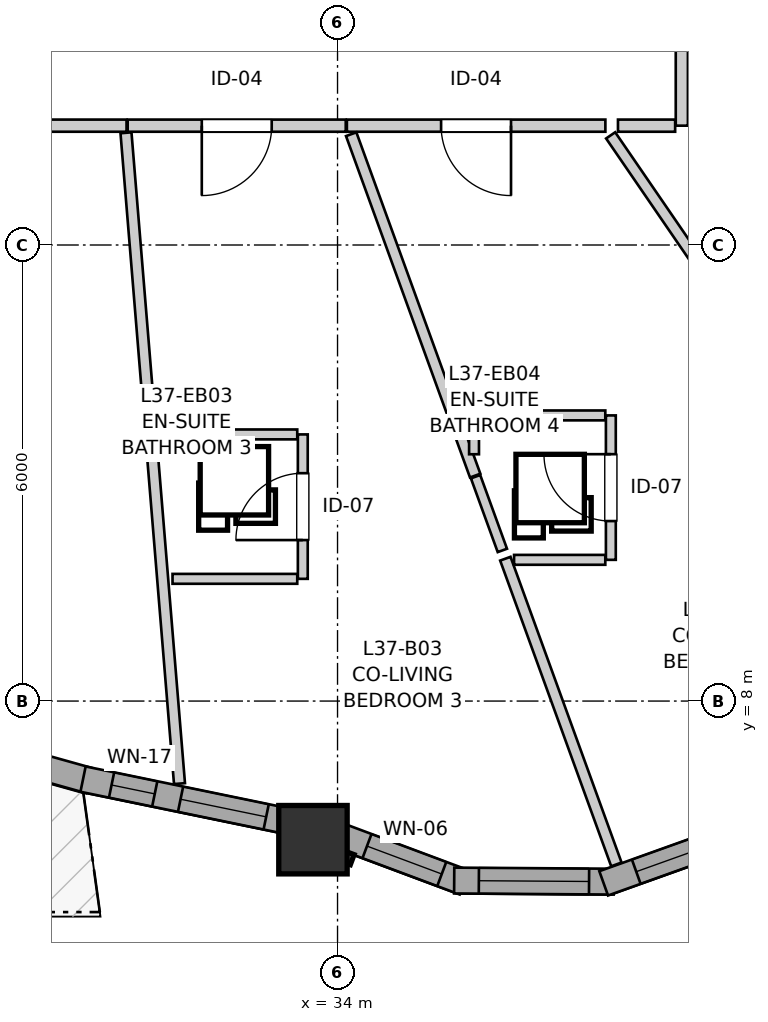
"""IFC4 building model, lengths in metres.
Left out: names, types, materials, properties, quantities, classifications, styles, units other than length and angle.
Written with IfcOpenShell. Run it as: python <this file> out.ifc"""

import sys

from ifc_helpers import new_model, si_unit, direction, frame, frame_2d, origin, origin_2d, place, context, subcontext, project, spatial, rectangle, extrude, source, transform, mapped, element, fill, save


model = new_model("IFC4")
c1 = context("Model", 3, precision=1e-05, world=origin(), true_north=direction((0.0, 1.0)))
c2 = subcontext(c1, "Body", "Model", "MODEL_VIEW")
j1 = project(units=[si_unit("LENGTHUNIT", "METRE"), si_unit("PLANEANGLEUNIT", "RADIAN")], contexts=[c1])
p1 = place(None, origin())
s1 = spatial("IfcSite", under=j1, at=p1, CompositionType="ELEMENT")
p2 = place(p1, origin())
s2 = spatial("IfcBuilding", under=s1, at=p2, CompositionType="ELEMENT")
p3 = place(p2, frame((0.0, 0.0, 124.8)))
s3 = spatial("IfcBuildingStorey", under=s2, at=p3, CompositionType="ELEMENT", Elevation=124.8)
m1 = source(origin(), c2, "Body", "SweptSolid", [
    extrude(rectangle(XDim=0.9, YDim=0.9, at=origin_2d()), origin(), (0.0, 0.0, 1.0), 2.9),
])
p4 = place(p3, frame((33.677, 6.176, 0.0), z_axis=(0.0, 0.0, 1.0), x_axis=(1.0, 0.0, 0.0)))
e1 = element("IfcColumn", 1, at=p4, inside=s3, PredefinedType="COLUMN", context=c2, shape_type="MappedRepresentation", body=[
    mapped(m1, transform((0.0, 0.0, 0.0), x_axis=(1.0, 0.0, 0.0), y_axis=(0.0, 1.0, 0.0), z_axis=(0.0, 0.0, 1.0), scale=1.0)),
])
p5 = place(p3, frame((27.811, 7.771, 0.0), z_axis=(0.0, 0.0, 1.0), x_axis=(0.963039905189, -0.269358758934, 0.0)))
e2 = element("IfcWall", 2, at=p5, inside=s3, PredefinedType="SOLIDWALL", context=c2, shape_type="SweptSolid", body=[
    extrude(rectangle(XDim=3.039, YDim=0.34, at=frame_2d((1.52, 0.0))), origin(), (0.0, 0.0, 1.0), 2.43),
])
p6 = place(p5, frame((0.935, 0.0, 0.82)))
e3 = element("IfcOpeningElement", 3, at=p6, cuts=e2, PredefinedType="OPENING", context=c2, shape_type="SweptSolid", body=[
    extrude(rectangle(XDim=1.15, YDim=1.2, at=frame_2d((0.575, 0.6))), frame((0.0, 0.18, 0.0), z_axis=(0.0, -1.0, 0.0), x_axis=(1.0, 0.0, 0.0)), (0.0, 0.0, 1.0), 0.36),
])
p7 = place(p3, frame((30.652, 6.973, 0.0), z_axis=(0.0, 0.0, 1.0), x_axis=(0.979418300652, -0.201841007595, 0.0)))
e4 = element("IfcWall", 4, at=p7, inside=s3, PredefinedType="SOLIDWALL", context=c2, shape_type="SweptSolid", body=[
    extrude(rectangle(XDim=2.893, YDim=0.34, at=frame_2d((1.447, 0.0))), origin(), (0.0, 0.0, 1.0), 2.43),
])
p8 = place(p7, frame((0.383, 0.0, 0.82)))
e5 = element("IfcOpeningElement", 5, at=p8, cuts=e4, PredefinedType="OPENING", context=c2, shape_type="SweptSolid", body=[
    extrude(rectangle(XDim=0.58, YDim=1.35, at=frame_2d((0.29, 0.675))), frame((0.0, 0.18, 0.0), z_axis=(0.0, -1.0, 0.0), x_axis=(1.0, 0.0, 0.0)), (0.0, 0.0, 1.0), 0.36),
])
p9 = place(p7, frame((1.31, 0.0, 0.82)))
e6 = element("IfcOpeningElement", 6, at=p9, cuts=e4, PredefinedType="OPENING", context=c2, shape_type="SweptSolid", body=[
    extrude(rectangle(XDim=1.15, YDim=1.2, at=frame_2d((0.575, 0.6))), frame((0.0, 0.18, 0.0), z_axis=(0.0, -1.0, 0.0), x_axis=(1.0, 0.0, 0.0)), (0.0, 0.0, 1.0), 0.36),
])
p10 = place(p3, frame((33.952, 6.255, 0.0), z_axis=(0.0, 0.0, 1.0), x_axis=(0.936799566991, -0.349866504951, 0.0)))
e7 = element("IfcWall", 7, at=p10, inside=s3, PredefinedType="SOLIDWALL", context=c2, shape_type="SweptSolid", body=[
    extrude(rectangle(XDim=1.831, YDim=0.34, at=frame_2d((0.916, 0.0))), origin(), (0.0, 0.0, 1.0), 2.43),
])
p11 = place(p10, frame((0.466, 0.0, 0.82)))
e8 = element("IfcOpeningElement", 8, at=p11, cuts=e7, PredefinedType="OPENING", context=c2, shape_type="SweptSolid", body=[
    extrude(rectangle(XDim=1.05, YDim=1.45, at=frame_2d((0.525, 0.725))), frame((0.0, 0.18, 0.0), z_axis=(0.0, -1.0, 0.0), x_axis=(1.0, 0.0, 0.0)), (0.0, 0.0, 1.0), 0.36),
])
p12 = place(p3, frame((35.535, 5.639, 0.0), z_axis=(0.0, 0.0, 1.0), x_axis=(0.999976456891, -0.00686189939, 0.0)))
e9 = element("IfcWall", 9, at=p12, inside=s3, PredefinedType="SOLIDWALL", context=c2, shape_type="SweptSolid", body=[
    extrude(rectangle(XDim=2.099, YDim=0.34, at=frame_2d((1.05, 0.0))), origin(), (0.0, 0.0, 1.0), 2.43),
])
p13 = place(p12, frame((0.324, 0.0, 0.82)))
e10 = element("IfcOpeningElement", 10, at=p13, cuts=e9, PredefinedType="OPENING", context=c2, shape_type="SweptSolid", body=[
    extrude(rectangle(XDim=1.45, YDim=1.25, at=frame_2d((0.725, 0.625))), frame((0.0, 0.18, 0.0), z_axis=(0.0, -1.0, 0.0), x_axis=(1.0, 0.0, 0.0)), (0.0, 0.0, 1.0), 0.36),
])
p14 = place(p3, frame((37.502, 5.602, 0.0), z_axis=(0.0, 0.0, 1.0), x_axis=(0.941523304278, 0.336947870598, 0.0)))
e11 = element("IfcWall", 11, at=p14, inside=s3, PredefinedType="SOLIDWALL", context=c2, shape_type="SweptSolid", body=[
    extrude(rectangle(XDim=2.099, YDim=0.34, at=frame_2d((1.05, 0.0))), origin(), (0.0, 0.0, 1.0), 2.43),
])
p15 = place(p14, frame((0.455, 0.0, 0.82)))
e12 = element("IfcOpeningElement", 12, at=p15, cuts=e11, PredefinedType="OPENING", context=c2, shape_type="SweptSolid", body=[
    extrude(rectangle(XDim=1.35, YDim=1.45, at=frame_2d((0.675, 0.725))), frame((0.0, 0.18, 0.0), z_axis=(0.0, -1.0, 0.0), x_axis=(1.0, 0.0, 0.0)), (0.0, 0.0, 1.0), 0.36),
])
p16 = place(p3, frame((38.53, 21.321, 0.0), z_axis=(0.0, 0.0, 1.0), x_axis=(0.0, -1.0, 0.0)))
e13 = element("IfcWall", 13, at=p16, inside=s3, PredefinedType="PARTITIONING", context=c2, shape_type="SweptSolid", body=[
    extrude(rectangle(XDim=5.751, YDim=0.16, at=frame_2d((2.875, 0.0))), origin(), (0.0, 0.0, 1.0), 2.9),
])
p17 = place(p16, frame((2.404, 0.0, 0.0)))
e14 = element("IfcOpeningElement", 14, at=p17, cuts=e13, PredefinedType="OPENING", context=c2, shape_type="SweptSolid", body=[
    extrude(rectangle(XDim=0.96, YDim=2.1, at=frame_2d((0.48, 1.05))), frame((0.0, 0.09, 0.0), z_axis=(0.0, -1.0, 0.0), x_axis=(1.0, 0.0, 0.0)), (0.0, 0.0, 1.0), 0.18),
])
p18 = place(p3, frame((31.224, 15.57, 0.0), z_axis=(0.0, 0.0, 1.0), x_axis=(-1.0, 0.0, 0.0)))
e15 = element("IfcWall", 15, at=p18, inside=s3, PredefinedType="PARTITIONING", context=c2, shape_type="SweptSolid", body=[
    extrude(rectangle(XDim=3.679, YDim=0.16, at=frame_2d((1.84, 0.0))), origin(), (0.0, 0.0, 1.0), 2.9),
])
p19 = place(p18, frame((1.212, 0.0, 0.0)))
e16 = element("IfcOpeningElement", 16, at=p19, cuts=e15, PredefinedType="OPENING", context=c2, shape_type="SweptSolid", body=[
    extrude(rectangle(XDim=1.3, YDim=2.1, at=frame_2d((0.65, 1.05))), frame((0.0, 0.09, 0.0), z_axis=(0.0, -1.0, 0.0), x_axis=(1.0, 0.0, 0.0)), (0.0, 0.0, 1.0), 0.18),
])
p20 = place(p3, frame((37.524, 15.57, 0.0), z_axis=(0.0, 0.0, 1.0), x_axis=(-1.0, 0.0, 0.0)))
e17 = element("IfcWall", 17, at=p20, inside=s3, PredefinedType="PARTITIONING", context=c2, shape_type="SweptSolid", body=[
    extrude(rectangle(XDim=3.401, YDim=0.16, at=frame_2d((1.7, 0.0))), origin(), (0.0, 0.0, 1.0), 2.9),
])
p21 = place(p20, frame((1.241, 0.0, 0.0)))
e18 = element("IfcOpeningElement", 18, at=p21, cuts=e17, PredefinedType="OPENING", context=c2, shape_type="SweptSolid", body=[
    extrude(rectangle(XDim=0.92, YDim=2.1, at=frame_2d((0.46, 1.05))), frame((0.0, 0.09, 0.0), z_axis=(0.0, -1.0, 0.0), x_axis=(1.0, 0.0, 0.0)), (0.0, 0.0, 1.0), 0.18),
])
p22 = place(p3, frame((34.108, 15.57, 0.0), z_axis=(0.0, 0.0, 1.0), x_axis=(-1.0, 0.0, 0.0)))
e19 = element("IfcWall", 19, at=p22, inside=s3, PredefinedType="PARTITIONING", context=c2, shape_type="SweptSolid", body=[
    extrude(rectangle(XDim=2.869, YDim=0.16, at=frame_2d((1.435, 0.0))), origin(), (0.0, 0.0, 1.0), 2.9),
])
p23 = place(p22, frame((0.974, 0.0, 0.0)))
e20 = element("IfcOpeningElement", 20, at=p23, cuts=e19, PredefinedType="OPENING", context=c2, shape_type="SweptSolid", body=[
    extrude(rectangle(XDim=0.92, YDim=2.1, at=frame_2d((0.46, 1.05))), frame((0.0, 0.09, 0.0), z_axis=(0.0, -1.0, 0.0), x_axis=(1.0, 0.0, 0.0)), (0.0, 0.0, 1.0), 0.18),
])
p24 = place(p3, frame((33.543, 9.608, 0.0), z_axis=(0.0, 0.0, 1.0), x_axis=(0.0, 1.0, 0.0)))
e21 = element("IfcWall", 21, at=p24, inside=s3, PredefinedType="PARTITIONING", context=c2, shape_type="SweptSolid", body=[
    extrude(rectangle(XDim=1.9, YDim=0.13, at=frame_2d((0.95, 0.0))), origin(), (0.0, 0.0, 1.0), 2.9),
])
p25 = place(p24, frame((0.51, 0.0, 0.0)))
e22 = element("IfcOpeningElement", 22, at=p25, cuts=e21, PredefinedType="OPENING", context=c2, shape_type="SweptSolid", body=[
    extrude(rectangle(XDim=0.88, YDim=2.05, at=frame_2d((0.44, 1.025))), frame((0.0, 0.075, 0.0), z_axis=(0.0, -1.0, 0.0), x_axis=(1.0, 0.0, 0.0)), (0.0, 0.0, 1.0), 0.15),
])
p26 = place(p3, frame((37.596, 9.858, 0.0), z_axis=(0.0, 0.0, 1.0), x_axis=(0.0, 1.0, 0.0)))
e23 = element("IfcWall", 23, at=p26, inside=s3, PredefinedType="PARTITIONING", context=c2, shape_type="SweptSolid", body=[
    extrude(rectangle(XDim=1.9, YDim=0.13, at=frame_2d((0.95, 0.0))), origin(), (0.0, 0.0, 1.0), 2.9),
])
p27 = place(p26, frame((0.51, 0.0, 0.0)))
e24 = element("IfcOpeningElement", 24, at=p27, cuts=e23, PredefinedType="OPENING", context=c2, shape_type="SweptSolid", body=[
    extrude(rectangle(XDim=0.88, YDim=2.05, at=frame_2d((0.44, 1.025))), frame((0.0, 0.075, 0.0), z_axis=(0.0, -1.0, 0.0), x_axis=(1.0, 0.0, 0.0)), (0.0, 0.0, 1.0), 0.15),
])
p28 = place(p3, frame((31.217, 15.476, 0.0), z_axis=(0.0, 0.0, 1.0), x_axis=(0.081928316893, -0.996638224679, 0.0)))
e25 = element("IfcWall", 25, at=p28, inside=s3, PredefinedType="PARTITIONING", context=c2, shape_type="SweptSolid", body=[
    extrude(rectangle(XDim=8.591, YDim=0.145, at=frame_2d((4.295, 0.0))), origin(), (0.0, 0.0, 1.0), 2.9),
])
p29 = place(p3, frame((37.594, 15.442, 0.0), z_axis=(0.0, 0.0, 1.0), x_axis=(0.565681325722, -0.824623937155, 0.0)))
e26 = element("IfcWall", 26, at=p29, inside=s3, PredefinedType="PARTITIONING", context=c2, shape_type="SweptSolid", body=[
    extrude(rectangle(XDim=7.35, YDim=0.145, at=frame_2d((3.675, 0.0))), origin(), (0.0, 0.0, 1.0), 2.9),
])
p30 = place(p3, frame((34.18, 15.458, 0.0), z_axis=(0.0, 0.0, 1.0), x_axis=(0.341373856507, -0.939927598325, 0.0)))
e27 = element("IfcWall", 27, at=p30, inside=s3, PredefinedType="PARTITIONING", context=c2, shape_type="SweptSolid", body=[
    extrude(rectangle(XDim=4.779, YDim=0.145, at=frame_2d((2.389, 0.0))), origin(), (0.0, 0.0, 1.0), 2.9),
])
p31 = place(p3, frame((36.208, 9.873, 0.0), z_axis=(0.0, 0.0, 1.0), x_axis=(0.341362804218, -0.939931612351, 0.0)))
e28 = element("IfcWall", 28, at=p31, inside=s3, PredefinedType="PARTITIONING", context=c2, shape_type="SweptSolid", body=[
    extrude(rectangle(XDim=4.279, YDim=0.145, at=frame_2d((2.14, 0.0))), origin(), (0.0, 0.0, 1.0), 2.9),
])
p32 = place(p3, frame((31.743, 11.508, 0.0), z_axis=(0.0, 0.0, 1.0), x_axis=(1.0, 0.0, 0.0)))
e29 = element("IfcWall", 29, at=p32, inside=s3, PredefinedType="PARTITIONING", context=c2, shape_type="SweptSolid", body=[
    extrude(rectangle(XDim=1.727, YDim=0.13, at=frame_2d((0.864, 0.0))), origin(), (0.0, 0.0, 1.0), 2.9),
])
p33 = place(p3, frame((31.829, 9.608, 0.0), z_axis=(0.0, 0.0, 1.0), x_axis=(1.0, 0.0, 0.0)))
e30 = element("IfcWall", 30, at=p33, inside=s3, PredefinedType="PARTITIONING", context=c2, shape_type="SweptSolid", body=[
    extrude(rectangle(XDim=1.641, YDim=0.13, at=frame_2d((0.82, 0.0))), origin(), (0.0, 0.0, 1.0), 2.508),
])
p34 = place(p3, frame((35.796, 11.758, 0.0), z_axis=(0.0, 0.0, 1.0), x_axis=(1.0, 0.0, 0.0)))
e31 = element("IfcWall", 31, at=p34, inside=s3, PredefinedType="PARTITIONING", context=c2, shape_type="SweptSolid", body=[
    extrude(rectangle(XDim=1.727, YDim=0.13, at=frame_2d((0.864, 0.0))), origin(), (0.0, 0.0, 1.0), 2.9),
])
p35 = place(p3, frame((36.323, 9.858, 0.0), z_axis=(0.0, 0.0, 1.0), x_axis=(1.0, 0.0, 0.0)))
e32 = element("IfcWall", 32, at=p35, inside=s3, PredefinedType="PARTITIONING", context=c2, shape_type="SweptSolid", body=[
    extrude(rectangle(XDim=1.2, YDim=0.13, at=frame_2d((0.6, 0.0))), origin(), (0.0, 0.0, 1.0), 2.9),
])
p36 = place(p3, frame((35.816, 10.952, 0.0), z_axis=(0.0, 0.0, 1.0), x_axis=(0.341515178303, -0.939876259403, 0.0)))
e33 = element("IfcWall", 33, at=p36, inside=s3, PredefinedType="PARTITIONING", context=c2, shape_type="SweptSolid", body=[
    extrude(rectangle(XDim=1.032, YDim=0.13, at=frame_2d((0.516, 0.0))), origin(), (0.0, 0.0, 1.0), 2.9),
])
p37 = place(p3, frame((37.69, 15.57, 0.0), z_axis=(0.0, 0.0, 1.0), x_axis=(1.0, 0.0, 0.0)))
e34 = element("IfcWall", 34, at=p37, inside=s3, PredefinedType="PARTITIONING", context=c2, shape_type="SweptSolid", body=[
    extrude(rectangle(XDim=0.752, YDim=0.16, at=frame_2d((0.376, 0.0))), origin(), (0.0, 0.0, 1.0), 2.9),
])
p38 = place(p3, frame((35.796, 11.247, 0.0), z_axis=(0.0, 0.0, 1.0), x_axis=(0.0, 1.0, 0.0)))
e35 = element("IfcWall", 35, at=p38, inside=s3, PredefinedType="PARTITIONING", context=c2, shape_type="SweptSolid", body=[
    extrude(rectangle(XDim=0.438, YDim=0.13, at=frame_2d((0.219, 0.0))), origin(), (0.0, 0.0, 1.0), 2.9),
])
m2 = source(origin(), c2, "Body", "SweptSolid", [
    extrude(rectangle(XDim=0.58, YDim=1.35, at=frame_2d((0.29, 0.675))), frame((0.0, 0.03, 0.0), z_axis=(0.0, -1.0, 0.0), x_axis=(1.0, 0.0, 0.0)), (0.0, 0.0, 1.0), 0.06),
])
p39 = place(p8, origin())
e36 = element("IfcWindow", 36, at=p39, inside=s3, PartitioningType="SINGLE_PANEL", PredefinedType="WINDOW", context=c2, shape_type="MappedRepresentation", body=[
    mapped(m2, transform((0.0, 0.0, 0.0), x_axis=(1.0, 0.0, 0.0), y_axis=(0.0, 1.0, 0.0), z_axis=(0.0, 0.0, 1.0), scale=1.0)),
])
fill(e5, e36)
m3 = source(origin(), c2, "Body", "SweptSolid", [
    extrude(rectangle(XDim=1.15, YDim=1.2, at=frame_2d((0.575, 0.6))), frame((0.0, 0.03, 0.0), z_axis=(0.0, -1.0, 0.0), x_axis=(1.0, 0.0, 0.0)), (0.0, 0.0, 1.0), 0.06),
])
p40 = place(p9, origin())
e37 = element("IfcWindow", 37, at=p40, inside=s3, PartitioningType="SINGLE_PANEL", PredefinedType="WINDOW", context=c2, shape_type="MappedRepresentation", body=[
    mapped(m3, transform((0.0, 0.0, 0.0), x_axis=(1.0, 0.0, 0.0), y_axis=(0.0, 1.0, 0.0), z_axis=(0.0, 0.0, 1.0), scale=1.0)),
])
fill(e6, e37)
m4 = source(origin(), c2, "Body", "SweptSolid", [
    extrude(rectangle(XDim=1.05, YDim=1.45, at=frame_2d((0.525, 0.725))), frame((0.0, 0.03, 0.0), z_axis=(0.0, -1.0, 0.0), x_axis=(1.0, 0.0, 0.0)), (0.0, 0.0, 1.0), 0.06),
])
p41 = place(p11, origin())
e38 = element("IfcWindow", 38, at=p41, inside=s3, PartitioningType="SINGLE_PANEL", PredefinedType="WINDOW", context=c2, shape_type="MappedRepresentation", body=[
    mapped(m4, transform((0.0, 0.0, 0.0), x_axis=(1.0, 0.0, 0.0), y_axis=(0.0, 1.0, 0.0), z_axis=(0.0, 0.0, 1.0), scale=1.0)),
])
fill(e8, e38)
m5 = source(origin(), c2, "Body", "SweptSolid", [
    extrude(rectangle(XDim=1.45, YDim=1.25, at=frame_2d((0.725, 0.625))), frame((0.0, 0.03, 0.0), z_axis=(0.0, -1.0, 0.0), x_axis=(1.0, 0.0, 0.0)), (0.0, 0.0, 1.0), 0.06),
])
p42 = place(p13, origin())
e39 = element("IfcWindow", 39, at=p42, inside=s3, PartitioningType="SINGLE_PANEL", PredefinedType="WINDOW", context=c2, shape_type="MappedRepresentation", body=[
    mapped(m5, transform((0.0, 0.0, 0.0), x_axis=(1.0, 0.0, 0.0), y_axis=(0.0, 1.0, 0.0), z_axis=(0.0, 0.0, 1.0), scale=1.0)),
])
fill(e10, e39)
m6 = source(origin(), c2, "Body", "SweptSolid", [
    extrude(rectangle(XDim=1.35, YDim=1.45, at=frame_2d((0.675, 0.725))), frame((0.0, 0.03, 0.0), z_axis=(0.0, -1.0, 0.0), x_axis=(1.0, 0.0, 0.0)), (0.0, 0.0, 1.0), 0.06),
])
p43 = place(p15, origin())
e40 = element("IfcWindow", 40, at=p43, inside=s3, PartitioningType="SINGLE_PANEL", PredefinedType="WINDOW", context=c2, shape_type="MappedRepresentation", body=[
    mapped(m6, transform((0.0, 0.0, 0.0), x_axis=(1.0, 0.0, 0.0), y_axis=(0.0, 1.0, 0.0), z_axis=(0.0, 0.0, 1.0), scale=1.0)),
])
fill(e12, e40)
m7 = source(origin(), c2, "Body", "SweptSolid", [
    extrude(rectangle(XDim=0.92, YDim=2.1, at=frame_2d((0.46, 1.05))), frame((0.0, 0.025, 0.0), z_axis=(0.0, -1.0, 0.0), x_axis=(1.0, 0.0, 0.0)), (0.0, 0.0, 1.0), 0.05),
])
p44 = place(p21, origin())
e41 = element("IfcDoor", 41, at=p44, inside=s3, OperationType="SINGLE_SWING_LEFT", PredefinedType="DOOR", context=c2, shape_type="MappedRepresentation", body=[
    mapped(m7, transform((0.0, 0.0, 0.0), x_axis=(1.0, 0.0, 0.0), y_axis=(0.0, 1.0, 0.0), z_axis=(0.0, 0.0, 1.0), scale=1.0)),
])
fill(e18, e41)
p45 = place(p23, origin())
e42 = element("IfcDoor", 42, at=p45, inside=s3, OperationType="SINGLE_SWING_RIGHT", PredefinedType="DOOR", context=c2, shape_type="MappedRepresentation", body=[
    mapped(m7, transform((0.0, 0.0, 0.0), x_axis=(1.0, 0.0, 0.0), y_axis=(0.0, 1.0, 0.0), z_axis=(0.0, 0.0, 1.0), scale=1.0)),
])
fill(e20, e42)
m8 = source(origin(), c2, "Body", "SweptSolid", [
    extrude(rectangle(XDim=0.88, YDim=2.05, at=frame_2d((0.44, 1.025))), frame((0.0, 0.025, 0.0), z_axis=(0.0, -1.0, 0.0), x_axis=(1.0, 0.0, 0.0)), (0.0, 0.0, 1.0), 0.05),
])
p46 = place(p25, origin())
e43 = element("IfcDoor", 43, at=p46, inside=s3, OperationType="SINGLE_SWING_LEFT", PredefinedType="DOOR", context=c2, shape_type="MappedRepresentation", body=[
    mapped(m8, transform((0.0, 0.0, 0.0), x_axis=(1.0, 0.0, 0.0), y_axis=(0.0, 1.0, 0.0), z_axis=(0.0, 0.0, 1.0), scale=1.0)),
])
fill(e22, e43)
p47 = place(p27, origin())
e44 = element("IfcDoor", 44, at=p47, inside=s3, OperationType="SINGLE_SWING_RIGHT", PredefinedType="DOOR", context=c2, shape_type="MappedRepresentation", body=[
    mapped(m8, transform((0.0, 0.0, 0.0), x_axis=(1.0, 0.0, 0.0), y_axis=(0.0, 1.0, 0.0), z_axis=(0.0, 0.0, 1.0), scale=1.0)),
])
fill(e24, e44)
save(model, sys.argv[1])
